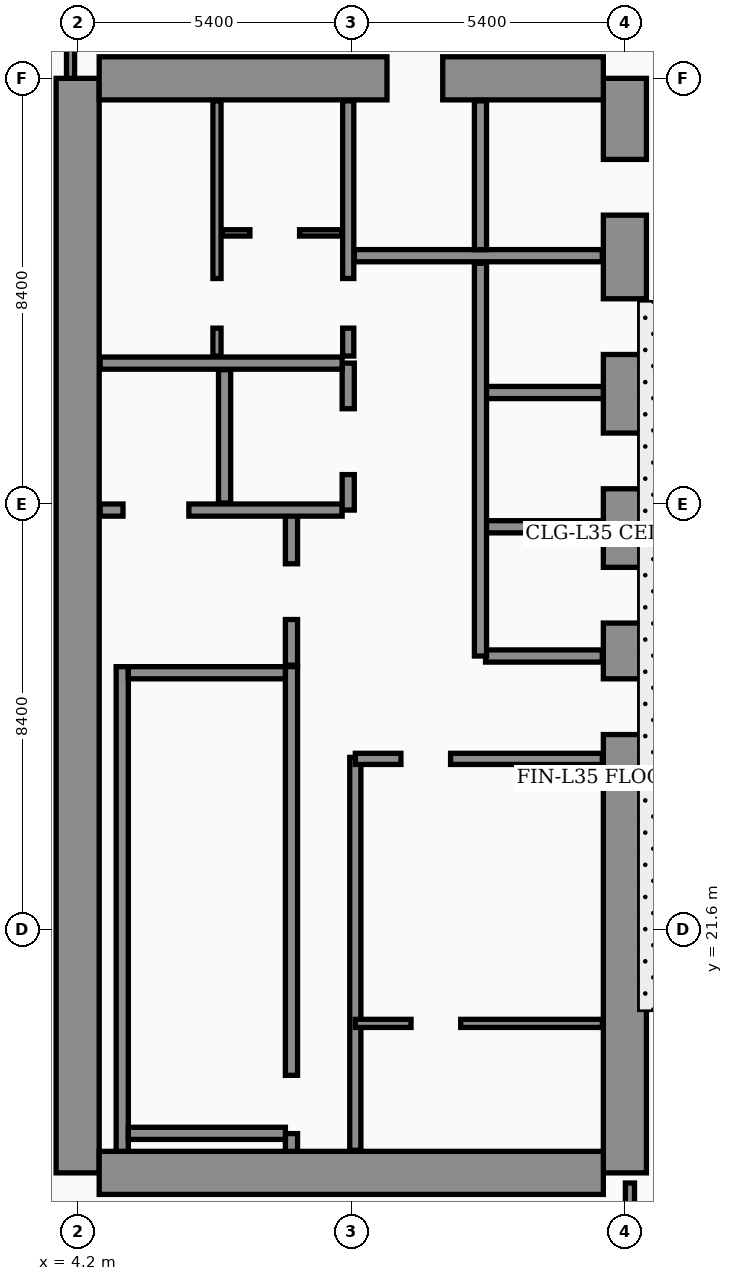
"""IFC4 building model, lengths in metres.
Left out: names, types, materials, properties, quantities, classifications, styles, units other than length and angle.
Written with IfcOpenShell. Run it as: python <this file> out.ifc"""

import sys

from ifc_helpers import new_model, si_unit, direction, frame, frame_2d, origin, place, context, subcontext, project, spatial, rectangle, extrude, element, fill, save


model = new_model("IFC4")
c1 = context("Model", 3, precision=1e-05, world=origin(), true_north=direction((0.0, 1.0)))
c2 = subcontext(c1, "Body", "Model", "MODEL_VIEW")
j1 = project(units=[si_unit("LENGTHUNIT", "METRE"), si_unit("PLANEANGLEUNIT", "RADIAN")], contexts=[c1])
p1 = place(None, origin())
s1 = spatial("IfcSite", under=j1, at=p1, CompositionType="ELEMENT")
p2 = place(p1, origin())
s2 = spatial("IfcBuilding", under=s1, at=p2, CompositionType="ELEMENT")
p3 = place(p2, frame((0.0, 0.0, 144.0)))
s3 = spatial("IfcBuildingStorey", under=s2, at=p3, CompositionType="ELEMENT", Elevation=144.0)
p4 = place(p3, frame((4.2, 16.8, 0.0), z_axis=(0.0, 0.0, 1.0), x_axis=(0.0, 1.0, 0.0)))
e1 = element("IfcWall", 1, at=p4, inside=s3, PredefinedType="SHEAR", context=c2, shape_type="SweptSolid", body=[
    extrude(rectangle(XDim=21.6, YDim=0.85, at=frame_2d((10.8, 0.0))), origin(), (0.0, 0.0, 1.0), 4.26),
])
p5 = place(p3, frame((15.0, 16.8, 0.0), z_axis=(0.0, 0.0, 1.0), x_axis=(0.0, 1.0, 0.0)))
e2 = element("IfcWall", 2, at=p5, inside=s3, PredefinedType="SHEAR", context=c2, shape_type="SweptSolid", body=[
    extrude(rectangle(XDim=21.6, YDim=0.85, at=frame_2d((10.8, 0.0))), origin(), (0.0, 0.0, 1.0), 4.26),
])
p6 = place(p5, frame((8.65, 0.0, 0.0)))
e3 = element("IfcOpeningElement", 3, at=p6, cuts=e2, PredefinedType="OPENING", context=c2, shape_type="SweptSolid", body=[
    extrude(rectangle(XDim=1.1, YDim=2.2, at=frame_2d((0.55, 1.1))), frame((0.0, 0.435, 0.0), z_axis=(0.0, -1.0, 0.0), x_axis=(1.0, 0.0, 0.0)), (0.0, 0.0, 1.0), 0.87),
])
p7 = place(p5, frame((10.85, 0.0, 0.0)))
e4 = element("IfcOpeningElement", 4, at=p7, cuts=e2, PredefinedType="OPENING", context=c2, shape_type="SweptSolid", body=[
    extrude(rectangle(XDim=1.1, YDim=2.2, at=frame_2d((0.55, 1.1))), frame((0.0, 0.435, 0.0), z_axis=(0.0, -1.0, 0.0), x_axis=(1.0, 0.0, 0.0)), (0.0, 0.0, 1.0), 0.87),
])
p8 = place(p5, frame((13.5, 0.0, 0.0)))
e5 = element("IfcOpeningElement", 5, at=p8, cuts=e2, PredefinedType="OPENING", context=c2, shape_type="SweptSolid", body=[
    extrude(rectangle(XDim=1.1, YDim=2.2, at=frame_2d((0.55, 1.1))), frame((0.0, 0.435, 0.0), z_axis=(0.0, -1.0, 0.0), x_axis=(1.0, 0.0, 0.0)), (0.0, 0.0, 1.0), 0.87),
])
p9 = place(p5, frame((16.15, 0.0, 0.0)))
e6 = element("IfcOpeningElement", 6, at=p9, cuts=e2, PredefinedType="OPENING", context=c2, shape_type="SweptSolid", body=[
    extrude(rectangle(XDim=1.1, YDim=2.2, at=frame_2d((0.55, 1.1))), frame((0.0, 0.435, 0.0), z_axis=(0.0, -1.0, 0.0), x_axis=(1.0, 0.0, 0.0)), (0.0, 0.0, 1.0), 0.87),
])
p10 = place(p5, frame((18.9, 0.0, 0.0)))
e7 = element("IfcOpeningElement", 7, at=p10, cuts=e2, PredefinedType="OPENING", context=c2, shape_type="SweptSolid", body=[
    extrude(rectangle(XDim=1.1, YDim=2.2, at=frame_2d((0.55, 1.1))), frame((0.0, 0.435, 0.0), z_axis=(0.0, -1.0, 0.0), x_axis=(1.0, 0.0, 0.0)), (0.0, 0.0, 1.0), 0.87),
])
p11 = place(p3, frame((4.625, 38.4, 0.0), z_axis=(0.0, 0.0, 1.0), x_axis=(1.0, 0.0, 0.0)))
e8 = element("IfcWall", 8, at=p11, inside=s3, PredefinedType="SHEAR", context=c2, shape_type="SweptSolid", body=[
    extrude(rectangle(XDim=9.95, YDim=0.85, at=frame_2d((4.975, 0.0))), origin(), (0.0, 0.0, 1.0), 4.26),
])
p12 = place(p11, frame((5.68, 0.0, 0.0)))
e9 = element("IfcOpeningElement", 9, at=p12, cuts=e8, PredefinedType="OPENING", context=c2, shape_type="SweptSolid", body=[
    extrude(rectangle(XDim=1.1, YDim=2.2, at=frame_2d((0.55, 1.1))), frame((0.0, 0.435, 0.0), z_axis=(0.0, -1.0, 0.0), x_axis=(1.0, 0.0, 0.0)), (0.0, 0.0, 1.0), 0.87),
])
p13 = place(p3, frame((4.625, 16.8, 0.0), z_axis=(0.0, 0.0, 1.0), x_axis=(1.0, 0.0, 0.0)))
e10 = element("IfcWall", 10, at=p13, inside=s3, PredefinedType="SHEAR", context=c2, shape_type="SweptSolid", body=[
    extrude(rectangle(XDim=9.95, YDim=0.85, at=frame_2d((4.975, 0.0))), origin(), (0.0, 0.0, 1.0), 4.26),
])
p14 = place(p3, frame((5.08, 17.225, 0.0), z_axis=(0.0, 0.0, 1.0), x_axis=(0.0, 1.0, 0.0)))
e11 = element("IfcWall", 11, at=p14, inside=s3, PredefinedType="SOLIDWALL", context=c2, shape_type="SweptSolid", body=[
    extrude(rectangle(XDim=9.565, YDim=0.24, at=frame_2d((4.782, 0.0))), origin(), (0.0, 0.0, 1.0), 4.26),
])
p15 = place(p3, frame((8.42, 17.225, 0.0), z_axis=(0.0, 0.0, 1.0), x_axis=(0.0, 1.0, 0.0)))
e12 = element("IfcWall", 12, at=p15, inside=s3, PredefinedType="SOLIDWALL", context=c2, shape_type="SweptSolid", body=[
    extrude(rectangle(XDim=9.565, YDim=0.24, at=frame_2d((4.782, 0.0))), origin(), (0.0, 0.0, 1.0), 4.26),
])
p16 = place(p15, frame((0.35, 0.0, 0.0)))
e13 = element("IfcOpeningElement", 13, at=p16, cuts=e12, PredefinedType="OPENING", context=c2, shape_type="SweptSolid", body=[
    extrude(rectangle(XDim=1.15, YDim=2.2, at=frame_2d((0.575, 1.1))), frame((0.0, 0.13, 0.0), z_axis=(0.0, -1.0, 0.0), x_axis=(1.0, 0.0, 0.0)), (0.0, 0.0, 1.0), 0.26),
])
for number, where, z_axis, x_axis in (
    (14, (5.2, 17.58, 0.0), (0.0, 0.0, 1.0), (1.0, 0.0, 0.0)),
    (15, (5.2, 26.67, 0.0), (0.0, 0.0, 1.0), (1.0, 0.0, 0.0)),
):
    element("IfcWall", number, at=place(p3, frame(where, z_axis=z_axis, x_axis=x_axis)), inside=s3, PredefinedType="SOLIDWALL", context=c2, shape_type="SweptSolid", body=[
        extrude(rectangle(XDim=3.1, YDim=0.24, at=frame_2d((1.55, 0.0))), origin(), (0.0, 0.0, 1.0), 4.26),
    ])
for number, where, z_axis, x_axis in (
    (16, (12.18, 29.55, 0.0), (0.0, 0.0, 1.0), (1.0, 0.0, 0.0)),
    (17, (12.18, 32.2, 0.0), (0.0, 0.0, 1.0), (1.0, 0.0, 0.0)),
):
    element("IfcWall", number, at=place(p3, frame(where, z_axis=z_axis, x_axis=x_axis)), inside=s3, PredefinedType="SOLIDWALL", context=c2, shape_type="SweptSolid", body=[
        extrude(rectangle(XDim=2.395, YDim=0.24, at=frame_2d((1.198, 0.0))), origin(), (0.0, 0.0, 1.0), 4.26),
    ])
p17 = place(p3, frame((8.42, 26.82, 0.0), z_axis=(0.0, 0.0, 1.0), x_axis=(0.0, 1.0, 0.0)))
e18 = element("IfcWall", 18, at=p17, inside=s3, PredefinedType="SOLIDWALL", context=c2, shape_type="SweptSolid", body=[
    extrude(rectangle(XDim=3.0, YDim=0.24, at=frame_2d((1.5, 0.0))), origin(), (0.0, 0.0, 1.0), 4.26),
])
p18 = place(p17, frame((0.9, 0.0, 0.0)))
e19 = element("IfcOpeningElement", 19, at=p18, cuts=e18, PredefinedType="OPENING", context=c2, shape_type="SweptSolid", body=[
    extrude(rectangle(XDim=1.1, YDim=2.2, at=frame_2d((0.55, 1.1))), frame((0.0, 0.13, 0.0), z_axis=(0.0, -1.0, 0.0), x_axis=(1.0, 0.0, 0.0)), (0.0, 0.0, 1.0), 0.26),
])
p19 = place(p3, frame((4.645, 29.88, 0.0), z_axis=(0.0, 0.0, 1.0), x_axis=(1.0, 0.0, 0.0)))
e20 = element("IfcWall", 20, at=p19, inside=s3, PredefinedType="SOLIDWALL", context=c2, shape_type="SweptSolid", body=[
    extrude(rectangle(XDim=4.775, YDim=0.24, at=frame_2d((2.387, 0.0))), origin(), (0.0, 0.0, 1.0), 4.26),
])
p20 = place(p19, frame((0.45, 0.0, 0.0)))
e21 = element("IfcOpeningElement", 21, at=p20, cuts=e20, PredefinedType="OPENING", context=c2, shape_type="SweptSolid", body=[
    extrude(rectangle(XDim=1.3, YDim=2.35, at=frame_2d((0.65, 1.175))), frame((0.0, 0.13, 0.0), z_axis=(0.0, -1.0, 0.0), x_axis=(1.0, 0.0, 0.0)), (0.0, 0.0, 1.0), 0.26),
])
p21 = place(p3, frame((7.1, 30.02, 0.0), z_axis=(0.0, 0.0, 1.0), x_axis=(0.0, 1.0, 0.0)))
e22 = element("IfcWall", 22, at=p21, inside=s3, PredefinedType="SOLIDWALL", context=c2, shape_type="SweptSolid", body=[
    extrude(rectangle(XDim=2.63, YDim=0.24, at=frame_2d((1.315, 0.0))), origin(), (0.0, 0.0, 1.0), 4.26),
])
p22 = place(p3, frame((9.54, 29.88, 0.0), z_axis=(0.0, 0.0, 1.0), x_axis=(0.0, 1.0, 0.0)))
e23 = element("IfcWall", 23, at=p22, inside=s3, PredefinedType="SOLIDWALL", context=c2, shape_type="SweptSolid", body=[
    extrude(rectangle(XDim=2.9, YDim=0.24, at=frame_2d((1.45, 0.0))), origin(), (0.0, 0.0, 1.0), 4.26),
])
p23 = place(p22, frame((0.7, 0.0, 0.0)))
e24 = element("IfcOpeningElement", 24, at=p23, cuts=e23, PredefinedType="OPENING", context=c2, shape_type="SweptSolid", body=[
    extrude(rectangle(XDim=1.3, YDim=2.35, at=frame_2d((0.65, 1.175))), frame((0.0, 0.13, 0.0), z_axis=(0.0, -1.0, 0.0), x_axis=(1.0, 0.0, 0.0)), (0.0, 0.0, 1.0), 0.26),
])
p24 = place(p3, frame((4.645, 32.78, 0.0), z_axis=(0.0, 0.0, 1.0), x_axis=(1.0, 0.0, 0.0)))
e25 = element("IfcWall", 25, at=p24, inside=s3, PredefinedType="SOLIDWALL", context=c2, shape_type="SweptSolid", body=[
    extrude(rectangle(XDim=4.775, YDim=0.24, at=frame_2d((2.387, 0.0))), origin(), (0.0, 0.0, 1.0), 3.89),
])
p25 = place(p3, frame((9.68, 17.245, 0.0), z_axis=(0.0, 0.0, 1.0), x_axis=(0.0, 1.0, 0.0)))
e26 = element("IfcWall", 26, at=p25, inside=s3, PredefinedType="SOLIDWALL", context=c2, shape_type="SweptSolid", body=[
    extrude(rectangle(XDim=7.755, YDim=0.22, at=frame_2d((3.877, 0.0))), origin(), (0.0, 0.0, 1.0), 4.26),
])
p26 = place(p3, frame((6.95, 32.92, 0.0), z_axis=(0.0, 0.0, 1.0), x_axis=(0.0, 1.0, 0.0)))
e27 = element("IfcWall", 27, at=p26, inside=s3, PredefinedType="PARTITIONING", context=c2, shape_type="SweptSolid", body=[
    extrude(rectangle(XDim=5.035, YDim=0.16, at=frame_2d((2.518, 0.0))), origin(), (0.0, 0.0, 1.0), 4.26),
])
p27 = place(p26, frame((0.55, 0.0, 0.0)))
e28 = element("IfcOpeningElement", 28, at=p27, cuts=e27, PredefinedType="OPENING", context=c2, shape_type="SweptSolid", body=[
    extrude(rectangle(XDim=0.98, YDim=2.15, at=frame_2d((0.49, 1.075))), frame((0.0, 0.09, 0.0), z_axis=(0.0, -1.0, 0.0), x_axis=(1.0, 0.0, 0.0)), (0.0, 0.0, 1.0), 0.18),
])
p28 = place(p3, frame((7.05, 35.35, 0.0), z_axis=(0.0, 0.0, 1.0), x_axis=(1.0, 0.0, 0.0)))
e29 = element("IfcWall", 29, at=p28, inside=s3, PredefinedType="PARTITIONING", context=c2, shape_type="SweptSolid", body=[
    extrude(rectangle(XDim=2.37, YDim=0.125, at=frame_2d((1.185, 0.0))), origin(), (0.0, 0.0, 1.0), 4.26),
])
p29 = place(p28, frame((0.55, 0.0, 0.0)))
e30 = element("IfcOpeningElement", 30, at=p29, cuts=e29, PredefinedType="OPENING", context=c2, shape_type="SweptSolid", body=[
    extrude(rectangle(XDim=0.98, YDim=2.15, at=frame_2d((0.49, 1.075))), frame((0.0, 0.073, 0.0), z_axis=(0.0, -1.0, 0.0), x_axis=(1.0, 0.0, 0.0)), (0.0, 0.0, 1.0), 0.145),
])
p30 = place(p3, frame((9.54, 32.92, 0.0), z_axis=(0.0, 0.0, 1.0), x_axis=(0.0, 1.0, 0.0)))
e31 = element("IfcWall", 31, at=p30, inside=s3, PredefinedType="SOLIDWALL", context=c2, shape_type="SweptSolid", body=[
    extrude(rectangle(XDim=5.035, YDim=0.22, at=frame_2d((2.518, 0.0))), origin(), (0.0, 0.0, 1.0), 4.26),
])
p31 = place(p30, frame((0.55, 0.0, 0.0)))
e32 = element("IfcOpeningElement", 32, at=p31, cuts=e31, PredefinedType="OPENING", context=c2, shape_type="SweptSolid", body=[
    extrude(rectangle(XDim=0.98, YDim=2.15, at=frame_2d((0.49, 1.075))), frame((0.0, 0.12, 0.0), z_axis=(0.0, -1.0, 0.0), x_axis=(1.0, 0.0, 0.0)), (0.0, 0.0, 1.0), 0.24),
])
p32 = place(p3, frame((9.68, 19.75, 0.0), z_axis=(0.0, 0.0, 1.0), x_axis=(1.0, 0.0, 0.0)))
e33 = element("IfcWall", 33, at=p32, inside=s3, PredefinedType="PARTITIONING", context=c2, shape_type="SweptSolid", body=[
    extrude(rectangle(XDim=4.875, YDim=0.16, at=frame_2d((2.438, 0.0))), origin(), (0.0, 0.0, 1.0), 4.26),
])
p33 = place(p32, frame((1.1, 0.0, 0.0)))
e34 = element("IfcOpeningElement", 34, at=p33, cuts=e33, PredefinedType="OPENING", context=c2, shape_type="SweptSolid", body=[
    extrude(rectangle(XDim=0.98, YDim=2.15, at=frame_2d((0.49, 1.075))), frame((0.0, 0.09, 0.0), z_axis=(0.0, -1.0, 0.0), x_axis=(1.0, 0.0, 0.0)), (0.0, 0.0, 1.0), 0.18),
])
p34 = place(p3, frame((9.68, 24.97, 0.0), z_axis=(0.0, 0.0, 1.0), x_axis=(1.0, 0.0, 0.0)))
e35 = element("IfcWall", 35, at=p34, inside=s3, PredefinedType="SOLIDWALL", context=c2, shape_type="SweptSolid", body=[
    extrude(rectangle(XDim=4.875, YDim=0.22, at=frame_2d((2.438, 0.0))), origin(), (0.0, 0.0, 1.0), 3.64),
])
p35 = place(p34, frame((0.9, 0.0, 0.0)))
e36 = element("IfcOpeningElement", 36, at=p35, cuts=e35, PredefinedType="OPENING", context=c2, shape_type="SweptSolid", body=[
    extrude(rectangle(XDim=0.98, YDim=2.15, at=frame_2d((0.49, 1.075))), frame((0.0, 0.12, 0.0), z_axis=(0.0, -1.0, 0.0), x_axis=(1.0, 0.0, 0.0)), (0.0, 0.0, 1.0), 0.24),
])
p36 = place(p3, frame((12.25, 27.0, 0.0), z_axis=(0.0, 0.0, 1.0), x_axis=(1.0, 0.0, 0.0)))
e37 = element("IfcWall", 37, at=p36, inside=s3, PredefinedType="SOLIDWALL", context=c2, shape_type="SweptSolid", body=[
    extrude(rectangle(XDim=2.305, YDim=0.24, at=frame_2d((1.152, 0.0))), origin(), (0.0, 0.0, 1.0), 4.26),
])
p37 = place(p3, frame((12.15, 27.0, 0.0), z_axis=(0.0, 0.0, 1.0), x_axis=(0.0, 1.0, 0.0)))
e38 = element("IfcWall", 38, at=p37, inside=s3, PredefinedType="SOLIDWALL", context=c2, shape_type="SweptSolid", body=[
    extrude(rectangle(XDim=7.75, YDim=0.24, at=frame_2d((3.875, 0.0))), origin(), (0.0, 0.0, 1.0), 4.26),
])
p38 = place(p3, frame((9.66, 34.9, 0.0), z_axis=(0.0, 0.0, 1.0), x_axis=(1.0, 0.0, 0.0)))
e39 = element("IfcWall", 39, at=p38, inside=s3, PredefinedType="SOLIDWALL", context=c2, shape_type="SweptSolid", body=[
    extrude(rectangle(XDim=4.895, YDim=0.24, at=frame_2d((2.448, 0.0))), origin(), (0.0, 0.0, 1.0), 4.26),
])
p39 = place(p3, frame((12.15, 35.02, 0.0), z_axis=(0.0, 0.0, 1.0), x_axis=(0.0, 1.0, 0.0)))
e40 = element("IfcWall", 40, at=p39, inside=s3, PredefinedType="SOLIDWALL", context=c2, shape_type="SweptSolid", body=[
    extrude(rectangle(XDim=2.935, YDim=0.24, at=frame_2d((1.468, 0.0))), origin(), (0.0, 0.0, 1.0), 4.26),
])
p40 = place(p3, frame((4.06, 38.4, 0.0), z_axis=(0.0, 0.0, 1.0), x_axis=(0.0, 1.0, 0.0)))
e41 = element("IfcWall", 41, at=p40, inside=s3, PredefinedType="PARTITIONING", context=c2, shape_type="SweptSolid", body=[
    extrude(rectangle(XDim=5.5, YDim=0.16, at=frame_2d((2.75, 0.0))), origin(), (0.0, 0.0, 1.0), 3.64),
])
p41 = place(p40, frame((3.2, 0.0, 0.0)))
e42 = element("IfcOpeningElement", 42, at=p41, cuts=e41, PredefinedType="OPENING", context=c2, shape_type="SweptSolid", body=[
    extrude(rectangle(XDim=1.02, YDim=2.2, at=frame_2d((0.51, 1.1))), frame((0.0, 0.09, 0.0), z_axis=(0.0, -1.0, 0.0), x_axis=(1.0, 0.0, 0.0)), (0.0, 0.0, 1.0), 0.18),
])
p42 = place(p3, frame((15.1, 2.6, 0.0), z_axis=(0.0, 0.0, 1.0), x_axis=(0.0, 1.0, 0.0)))
e43 = element("IfcWall", 43, at=p42, inside=s3, PredefinedType="PARTITIONING", context=c2, shape_type="SweptSolid", body=[
    extrude(rectangle(XDim=14.0, YDim=0.18, at=frame_2d((7.0, 0.0))), origin(), (0.0, 0.0, 1.0), 3.19),
])
p43 = place(p42, frame((11.8, 0.0, 0.0)))
e44 = element("IfcOpeningElement", 44, at=p43, cuts=e43, PredefinedType="OPENING", context=c2, shape_type="SweptSolid", body=[
    extrude(rectangle(XDim=1.5, YDim=2.22, at=frame_2d((0.75, 1.11))), frame((0.0, 0.1, 0.0), z_axis=(0.0, -1.0, 0.0), x_axis=(1.0, 0.0, 0.0)), (0.0, 0.0, 1.0), 0.2),
])
p44 = place(p18, origin())
e45 = element("IfcDoor", 45, at=p44, inside=s3, OperationType="SINGLE_SWING_RIGHT", PredefinedType="DOOR", context=c2, shape_type="SweptSolid", body=[
    extrude(rectangle(XDim=1.1, YDim=2.2, at=frame_2d((0.55, 1.1))), frame((0.0, 0.025, 0.0), z_axis=(0.0, -1.0, 0.0), x_axis=(1.0, 0.0, 0.0)), (0.0, 0.0, 1.0), 0.05),
])
fill(e19, e45)
p45 = place(p20, origin())
e46 = element("IfcDoor", 46, at=p45, inside=s3, OperationType="DOUBLE_DOOR_SLIDING", PredefinedType="DOOR", context=c2, shape_type="SweptSolid", body=[
    extrude(rectangle(XDim=1.3, YDim=2.35, at=frame_2d((0.65, 1.175))), frame((0.0, 0.025, 0.0), z_axis=(0.0, -1.0, 0.0), x_axis=(1.0, 0.0, 0.0)), (0.0, 0.0, 1.0), 0.05),
])
fill(e21, e46)
p46 = place(p23, origin())
e47 = element("IfcDoor", 47, at=p46, inside=s3, OperationType="DOUBLE_DOOR_SLIDING", PredefinedType="DOOR", context=c2, shape_type="SweptSolid", body=[
    extrude(rectangle(XDim=1.3, YDim=2.35, at=frame_2d((0.65, 1.175))), frame((0.0, 0.025, 0.0), z_axis=(0.0, -1.0, 0.0), x_axis=(1.0, 0.0, 0.0)), (0.0, 0.0, 1.0), 0.05),
])
fill(e24, e47)
p47 = place(p27, origin())
e48 = element("IfcDoor", 48, at=p47, inside=s3, OperationType="SINGLE_SWING_LEFT", PredefinedType="DOOR", context=c2, shape_type="SweptSolid", body=[
    extrude(rectangle(XDim=0.98, YDim=2.15, at=frame_2d((0.49, 1.075))), frame((0.0, 0.025, 0.0), z_axis=(0.0, -1.0, 0.0), x_axis=(1.0, 0.0, 0.0)), (0.0, 0.0, 1.0), 0.05),
])
fill(e28, e48)
p48 = place(p29, origin())
e49 = element("IfcDoor", 49, at=p48, inside=s3, OperationType="SINGLE_SWING_RIGHT", PredefinedType="DOOR", context=c2, shape_type="SweptSolid", body=[
    extrude(rectangle(XDim=0.98, YDim=2.15, at=frame_2d((0.49, 1.075))), frame((0.0, 0.025, 0.0), z_axis=(0.0, -1.0, 0.0), x_axis=(1.0, 0.0, 0.0)), (0.0, 0.0, 1.0), 0.05),
])
fill(e30, e49)
p49 = place(p31, origin())
e50 = element("IfcDoor", 50, at=p49, inside=s3, OperationType="SINGLE_SWING_LEFT", PredefinedType="DOOR", context=c2, shape_type="SweptSolid", body=[
    extrude(rectangle(XDim=0.98, YDim=2.15, at=frame_2d((0.49, 1.075))), frame((0.0, 0.025, 0.0), z_axis=(0.0, -1.0, 0.0), x_axis=(1.0, 0.0, 0.0)), (0.0, 0.0, 1.0), 0.05),
])
fill(e32, e50)
p50 = place(p33, origin())
e51 = element("IfcDoor", 51, at=p50, inside=s3, OperationType="SINGLE_SWING_LEFT", PredefinedType="DOOR", context=c2, shape_type="SweptSolid", body=[
    extrude(rectangle(XDim=0.98, YDim=2.15, at=frame_2d((0.49, 1.075))), frame((0.0, 0.025, 0.0), z_axis=(0.0, -1.0, 0.0), x_axis=(1.0, 0.0, 0.0)), (0.0, 0.0, 1.0), 0.05),
])
fill(e34, e51)
p51 = place(p35, origin())
e52 = element("IfcDoor", 52, at=p51, inside=s3, OperationType="SINGLE_SWING_RIGHT", PredefinedType="DOOR", context=c2, shape_type="SweptSolid", body=[
    extrude(rectangle(XDim=0.98, YDim=2.15, at=frame_2d((0.49, 1.075))), frame((0.0, 0.025, 0.0), z_axis=(0.0, -1.0, 0.0), x_axis=(1.0, 0.0, 0.0)), (0.0, 0.0, 1.0), 0.05),
])
fill(e36, e52)
p52 = place(p16, origin())
e53 = element("IfcDoor", 53, at=p52, inside=s3, OperationType="SINGLE_SWING_LEFT", PredefinedType="DOOR", context=c2, shape_type="SweptSolid", body=[
    extrude(rectangle(XDim=1.15, YDim=2.2, at=frame_2d((0.575, 1.1))), frame((0.0, 0.025, 0.0), z_axis=(0.0, -1.0, 0.0), x_axis=(1.0, 0.0, 0.0)), (0.0, 0.0, 1.0), 0.05),
])
fill(e13, e53)
p53 = place(p6, origin())
e54 = element("IfcDoor", 54, at=p53, inside=s3, OperationType="SINGLE_SWING_RIGHT", PredefinedType="DOOR", context=c2, shape_type="SweptSolid", body=[
    extrude(rectangle(XDim=1.1, YDim=2.2, at=frame_2d((0.55, 1.1))), frame((0.0, 0.025, 0.0), z_axis=(0.0, -1.0, 0.0), x_axis=(1.0, 0.0, 0.0)), (0.0, 0.0, 1.0), 0.05),
])
fill(e3, e54)
p54 = place(p7, origin())
e55 = element("IfcDoor", 55, at=p54, inside=s3, OperationType="DOUBLE_DOOR_SLIDING", PredefinedType="DOOR", context=c2, shape_type="SweptSolid", body=[
    extrude(rectangle(XDim=1.1, YDim=2.2, at=frame_2d((0.55, 1.1))), frame((0.0, 0.025, 0.0), z_axis=(0.0, -1.0, 0.0), x_axis=(1.0, 0.0, 0.0)), (0.0, 0.0, 1.0), 0.05),
])
fill(e4, e55)
p55 = place(p8, origin())
e56 = element("IfcDoor", 56, at=p55, inside=s3, OperationType="DOUBLE_DOOR_SLIDING", PredefinedType="DOOR", context=c2, shape_type="SweptSolid", body=[
    extrude(rectangle(XDim=1.1, YDim=2.2, at=frame_2d((0.55, 1.1))), frame((0.0, 0.025, 0.0), z_axis=(0.0, -1.0, 0.0), x_axis=(1.0, 0.0, 0.0)), (0.0, 0.0, 1.0), 0.05),
])
fill(e5, e56)
p56 = place(p9, origin())
e57 = element("IfcDoor", 57, at=p56, inside=s3, OperationType="DOUBLE_DOOR_SLIDING", PredefinedType="DOOR", context=c2, shape_type="SweptSolid", body=[
    extrude(rectangle(XDim=1.1, YDim=2.2, at=frame_2d((0.55, 1.1))), frame((0.0, 0.025, 0.0), z_axis=(0.0, -1.0, 0.0), x_axis=(1.0, 0.0, 0.0)), (0.0, 0.0, 1.0), 0.05),
])
fill(e6, e57)
p57 = place(p10, origin())
e58 = element("IfcDoor", 58, at=p57, inside=s3, OperationType="DOUBLE_DOOR_SLIDING", PredefinedType="DOOR", context=c2, shape_type="SweptSolid", body=[
    extrude(rectangle(XDim=1.1, YDim=2.2, at=frame_2d((0.55, 1.1))), frame((0.0, 0.025, 0.0), z_axis=(0.0, -1.0, 0.0), x_axis=(1.0, 0.0, 0.0)), (0.0, 0.0, 1.0), 0.05),
])
fill(e7, e58)
p58 = place(p12, origin())
e59 = element("IfcDoor", 59, at=p58, inside=s3, OperationType="DOUBLE_DOOR_SLIDING", PredefinedType="DOOR", context=c2, shape_type="SweptSolid", body=[
    extrude(rectangle(XDim=1.1, YDim=2.2, at=frame_2d((0.55, 1.1))), frame((0.0, 0.025, 0.0), z_axis=(0.0, -1.0, 0.0), x_axis=(1.0, 0.0, 0.0)), (0.0, 0.0, 1.0), 0.05),
])
fill(e9, e59)
save(model, sys.argv[1])
